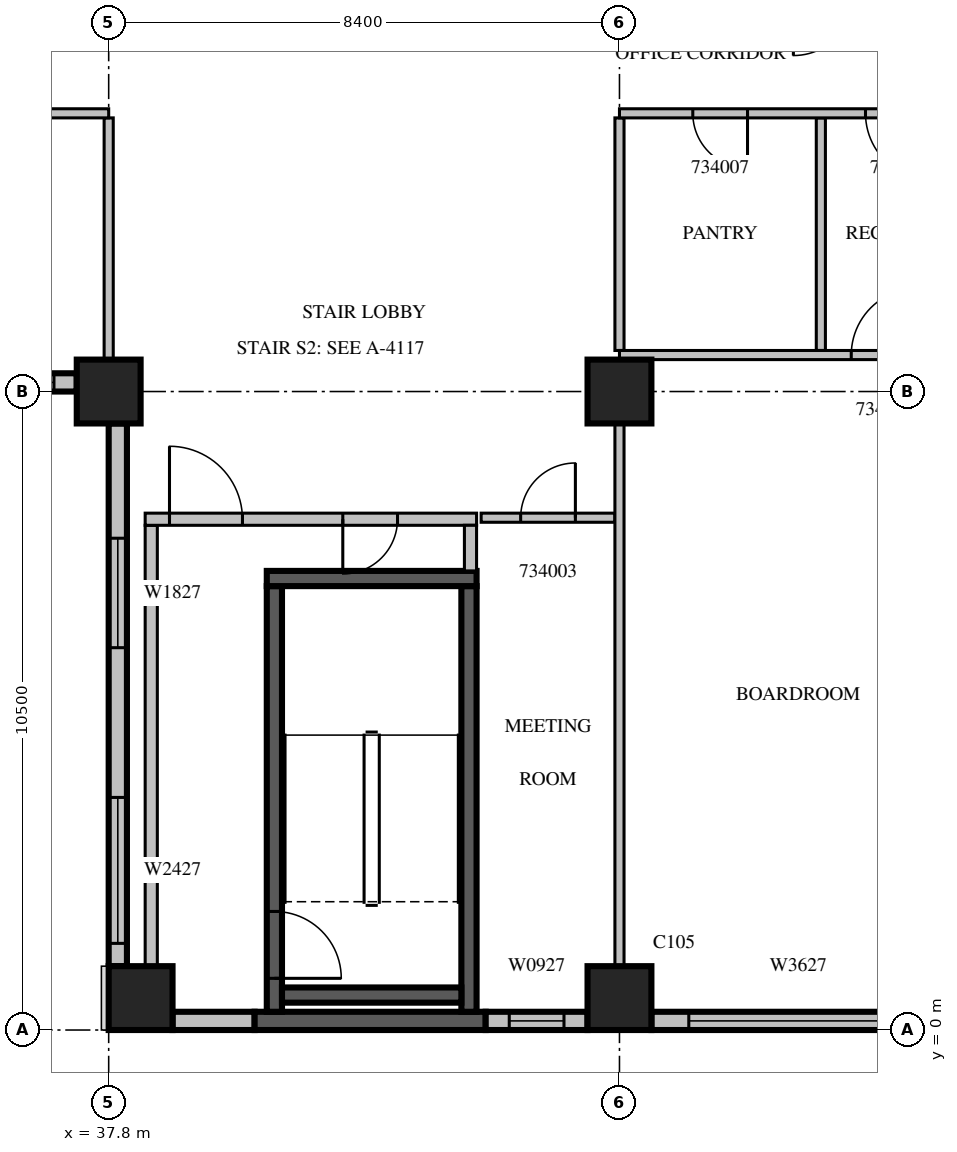
"""IFC4 building model, lengths in metres.
Left out: names, types, materials, properties, quantities, classifications, styles, units other than length and angle.
Written with IfcOpenShell. Run it as: python <this file> out.ifc"""

import sys

from ifc_helpers import new_model, si_unit, direction, frame, frame_2d, origin, origin_2d, place, context, subcontext, project, spatial, rectangle, extrude, source, transform, mapped, element, fill, save


model = new_model("IFC4")
c1 = context("Model", 3, precision=1e-05, world=origin(), true_north=direction((0.0, 1.0)))
c2 = subcontext(c1, "Body", "Model", "MODEL_VIEW")
j1 = project(units=[si_unit("LENGTHUNIT", "METRE"), si_unit("PLANEANGLEUNIT", "RADIAN")], contexts=[c1])
p1 = place(None, origin())
s1 = spatial("IfcSite", under=j1, at=p1, CompositionType="ELEMENT")
p2 = place(p1, origin())
s2 = spatial("IfcBuilding", under=s1, at=p2, CompositionType="ELEMENT")
p3 = place(p2, frame((0.0, 0.0, 153.9)))
s3 = spatial("IfcBuildingStorey", under=s2, at=p3, CompositionType="ELEMENT", Elevation=153.9)
m1 = source(origin(), c2, "Body", "SweptSolid", [
    extrude(rectangle(XDim=1.05, YDim=1.05, at=origin_2d()), origin(), (0.0, 0.0, 1.0), 4.2),
])
for number, where, z_axis, x_axis in (
    (1, (38.325, 0.525, 0.0), (0.0, 0.0, 1.0), (1.0, 0.0, 0.0)),
    (2, (46.2, 0.525, 0.0), (0.0, 0.0, 1.0), (1.0, 0.0, 0.0)),
    (3, (37.8, 10.5, 0.0), (0.0, 0.0, 1.0), (1.0, 0.0, 0.0)),
    (4, (46.2, 10.5, 0.0), (0.0, 0.0, 1.0), (1.0, 0.0, 0.0)),
):
    element("IfcColumn", number, at=place(p3, frame(where, z_axis=z_axis, x_axis=x_axis)), inside=s3, PredefinedType="COLUMN", context=c2, shape_type="MappedRepresentation", body=[
        mapped(m1, transform((0.0, 0.0, 0.0), scale=1.0)),
    ])
m2 = source(origin(), c2, "Body", "SweptSolid", [
    extrude(rectangle(XDim=7.35, YDim=0.3, at=frame_2d((3.675, 0.0))), origin(), (0.0, 0.0, 1.0), 3.8),
])
p4 = place(p3, frame((29.925, 10.65, 0.0), z_axis=(0.0, 0.0, 1.0), x_axis=(1.0, 0.0, 0.0)))
e5 = element("IfcWall", 5, at=p4, inside=s3, PredefinedType="STANDARD", context=c2, shape_type="MappedRepresentation", body=[
    mapped(m2, transform((0.0, 0.0, 0.0), scale=1.0)),
])
m3 = source(origin(), c2, "Body", "SweptSolid", [
    extrude(rectangle(XDim=2.4, YDim=2.7, at=frame_2d((1.2, 1.35))), frame((0.0, 0.16, 0.0), z_axis=(0.0, -1.0, 0.0), x_axis=(1.0, 0.0, 0.0)), (0.0, 0.0, 1.0), 0.32),
])
p5 = place(p4, frame((0.375, 0.0, 0.6)))
e6 = element("IfcOpeningElement", 6, at=p5, cuts=e5, PredefinedType="OPENING", context=c2, shape_type="MappedRepresentation", body=[
    mapped(m3, transform((0.0, 0.0, 0.0), scale=1.0)),
])
p6 = place(p4, frame((4.575, 0.0, 0.6)))
e7 = element("IfcOpeningElement", 7, at=p6, cuts=e5, PredefinedType="OPENING", context=c2, shape_type="MappedRepresentation", body=[
    mapped(m3, transform((0.0, 0.0, 0.0), scale=1.0)),
])
m4 = source(origin(), c2, "Body", "SweptSolid", [
    extrude(rectangle(XDim=8.925, YDim=0.3, at=frame_2d((4.463, 0.0))), origin(), (0.0, 0.0, 1.0), 3.8),
])
p7 = place(p3, frame((37.95, 9.975, 0.0), z_axis=(0.0, 0.0, 1.0), x_axis=(0.0, -1.0, 0.0)))
e8 = element("IfcWall", 8, at=p7, inside=s3, PredefinedType="STANDARD", context=c2, shape_type="MappedRepresentation", body=[
    mapped(m4, transform((0.0, 0.0, 0.0), scale=1.0)),
])
m5 = source(origin(), c2, "Body", "SweptSolid", [
    extrude(rectangle(XDim=1.8, YDim=2.7, at=frame_2d((0.9, 1.35))), frame((0.0, 0.16, 0.0), z_axis=(0.0, -1.0, 0.0), x_axis=(1.0, 0.0, 0.0)), (0.0, 0.0, 1.0), 0.32),
])
p8 = place(p7, frame((1.887, 0.0, 0.6)))
e9 = element("IfcOpeningElement", 9, at=p8, cuts=e8, PredefinedType="OPENING", context=c2, shape_type="MappedRepresentation", body=[
    mapped(m5, transform((0.0, 0.0, 0.0), scale=1.0)),
])
p9 = place(p7, frame((6.15, 0.0, 0.6)))
e10 = element("IfcOpeningElement", 10, at=p9, cuts=e8, PredefinedType="OPENING", context=c2, shape_type="MappedRepresentation", body=[
    mapped(m3, transform((0.0, 0.0, 0.0), scale=1.0)),
])
m6 = source(origin(), c2, "Body", "SweptSolid", [
    extrude(rectangle(XDim=1.35, YDim=0.3, at=frame_2d((0.675, 0.0))), origin(), (0.0, 0.0, 1.0), 3.8),
])
p10 = place(p3, frame((38.85, 0.15, 0.0), z_axis=(0.0, 0.0, 1.0), x_axis=(1.0, 0.0, 0.0)))
e11 = element("IfcWall", 11, at=p10, inside=s3, PredefinedType="STANDARD", context=c2, shape_type="MappedRepresentation", body=[
    mapped(m6, transform((0.0, 0.0, 0.0), scale=1.0)),
])
m7 = source(origin(), c2, "Body", "SweptSolid", [
    extrude(rectangle(XDim=3.8, YDim=0.3, at=frame_2d((1.9, 0.0))), origin(), (0.0, 0.0, 1.0), 3.8),
])
p11 = place(p3, frame((40.2, 0.15, 0.0), z_axis=(0.0, 0.0, 1.0), x_axis=(1.0, 0.0, 0.0)))
e12 = element("IfcWall", 12, at=p11, inside=s3, PredefinedType="SOLIDWALL", context=c2, shape_type="MappedRepresentation", body=[
    mapped(m7, transform((0.0, 0.0, 0.0), scale=1.0)),
])
m8 = source(origin(), c2, "Body", "SweptSolid", [
    extrude(rectangle(XDim=1.675, YDim=0.3, at=frame_2d((0.838, 0.0))), origin(), (0.0, 0.0, 1.0), 3.8),
])
p12 = place(p3, frame((44.0, 0.15, 0.0), z_axis=(0.0, 0.0, 1.0), x_axis=(1.0, 0.0, 0.0)))
e13 = element("IfcWall", 13, at=p12, inside=s3, PredefinedType="STANDARD", context=c2, shape_type="MappedRepresentation", body=[
    mapped(m8, transform((0.0, 0.0, 0.0), scale=1.0)),
])
m9 = source(origin(), c2, "Body", "SweptSolid", [
    extrude(rectangle(XDim=0.9, YDim=2.7, at=frame_2d((0.45, 1.35))), frame((0.0, 0.16, 0.0), z_axis=(0.0, -1.0, 0.0), x_axis=(1.0, 0.0, 0.0)), (0.0, 0.0, 1.0), 0.32),
])
p13 = place(p12, frame((0.388, 0.0, 0.6)))
e14 = element("IfcOpeningElement", 14, at=p13, cuts=e13, PredefinedType="OPENING", context=c2, shape_type="MappedRepresentation", body=[
    mapped(m9, transform((0.0, 0.0, 0.0), scale=1.0)),
])
m10 = source(origin(), c2, "Body", "SweptSolid", [
    extrude(rectangle(XDim=4.83, YDim=0.3, at=frame_2d((2.415, 0.0))), origin(), (0.0, 0.0, 1.0), 3.8),
])
p14 = place(p3, frame((46.725, 0.15, 0.0), z_axis=(0.0, 0.0, 1.0), x_axis=(1.0, 0.0, 0.0)))
e15 = element("IfcWall", 15, at=p14, inside=s3, PredefinedType="STANDARD", context=c2, shape_type="MappedRepresentation", body=[
    mapped(m10, transform((0.0, 0.0, 0.0), scale=1.0)),
])
m11 = source(origin(), c2, "Body", "SweptSolid", [
    extrude(rectangle(XDim=3.6, YDim=2.7, at=frame_2d((1.8, 1.35))), frame((0.0, 0.16, 0.0), z_axis=(0.0, -1.0, 0.0), x_axis=(1.0, 0.0, 0.0)), (0.0, 0.0, 1.0), 0.32),
])
p15 = place(p14, frame((0.615, 0.0, 0.6)))
e16 = element("IfcOpeningElement", 16, at=p15, cuts=e15, PredefinedType="OPENING", context=c2, shape_type="MappedRepresentation", body=[
    mapped(m11, transform((0.0, 0.0, 0.0), scale=1.0)),
])
m12 = source(origin(), c2, "Body", "SweptSolid", [
    extrude(rectangle(XDim=7.0, YDim=0.25, at=frame_2d((3.5, 0.0))), origin(), (0.0, 0.0, 1.0), 3.8),
])
p16 = place(p3, frame((40.525, 0.3, 0.0), z_axis=(0.0, 0.0, 1.0), x_axis=(0.0, 1.0, 0.0)))
e17 = element("IfcWall", 17, at=p16, inside=s3, PredefinedType="SOLIDWALL", context=c2, shape_type="MappedRepresentation", body=[
    mapped(m12, transform((0.0, 0.0, 0.0), scale=1.0)),
])
m13 = source(origin(), c2, "Body", "SweptSolid", [
    extrude(rectangle(XDim=1.1, YDim=2.1, at=frame_2d((0.55, 1.05))), frame((0.0, 0.135, 0.0), z_axis=(0.0, -1.0, 0.0), x_axis=(1.0, 0.0, 0.0)), (0.0, 0.0, 1.0), 0.27),
])
p17 = place(p16, frame((0.55, 0.0, 0.0)))
e18 = element("IfcOpeningElement", 18, at=p17, cuts=e17, PredefinedType="OPENING", context=c2, shape_type="MappedRepresentation", body=[
    mapped(m13, transform((0.0, 0.0, 0.0), scale=1.0)),
])
p18 = place(p3, frame((43.725, 0.3, 0.0), z_axis=(0.0, 0.0, 1.0), x_axis=(0.0, 1.0, 0.0)))
e19 = element("IfcWall", 19, at=p18, inside=s3, PredefinedType="SOLIDWALL", context=c2, shape_type="MappedRepresentation", body=[
    mapped(m12, transform((0.0, 0.0, 0.0), scale=1.0)),
])
m14 = source(origin(), c2, "Body", "SweptSolid", [
    extrude(rectangle(XDim=3.45, YDim=0.25, at=frame_2d((1.725, 0.0))), origin(), (0.0, 0.0, 1.0), 3.8),
])
p19 = place(p3, frame((40.4, 7.425, 0.0), z_axis=(0.0, 0.0, 1.0), x_axis=(1.0, 0.0, 0.0)))
e20 = element("IfcWall", 20, at=p19, inside=s3, PredefinedType="SOLIDWALL", context=c2, shape_type="MappedRepresentation", body=[
    mapped(m14, transform((0.0, 0.0, 0.0), scale=1.0)),
])
m15 = source(origin(), c2, "Body", "SweptSolid", [
    extrude(rectangle(XDim=2.95, YDim=0.25, at=frame_2d((1.475, 0.0))), origin(), (0.0, 0.0, 1.0), 3.8),
])
p20 = place(p3, frame((40.65, 0.575, 0.0), z_axis=(0.0, 0.0, 1.0), x_axis=(1.0, 0.0, 0.0)))
e21 = element("IfcWall", 21, at=p20, inside=s3, PredefinedType="SOLIDWALL", context=c2, shape_type="MappedRepresentation", body=[
    mapped(m15, transform((0.0, 0.0, 0.0), scale=1.0)),
])
m16 = source(origin(), c2, "Body", "SweptSolid", [
    extrude(rectangle(XDim=8.0, YDim=0.2, at=frame_2d((4.0, 0.0))), origin(), (0.0, 0.0, 1.0), 3.8),
])
p21 = place(p3, frame((38.5, 0.3, 0.0), z_axis=(0.0, 0.0, 1.0), x_axis=(0.0, 1.0, 0.0)))
e22 = element("IfcWall", 22, at=p21, inside=s3, PredefinedType="PARTITIONING", context=c2, shape_type="MappedRepresentation", body=[
    mapped(m16, transform((0.0, 0.0, 0.0), scale=1.0)),
])
m17 = source(origin(), c2, "Body", "SweptSolid", [
    extrude(rectangle(XDim=5.45, YDim=0.2, at=frame_2d((2.725, 0.0))), origin(), (0.0, 0.0, 1.0), 3.8),
])
p22 = place(p3, frame((38.4, 8.4, 0.0), z_axis=(0.0, 0.0, 1.0), x_axis=(1.0, 0.0, 0.0)))
e23 = element("IfcWall", 23, at=p22, inside=s3, PredefinedType="PARTITIONING", context=c2, shape_type="MappedRepresentation", body=[
    mapped(m17, transform((0.0, 0.0, 0.0), scale=1.0)),
])
m18 = source(origin(), c2, "Body", "SweptSolid", [
    extrude(rectangle(XDim=1.2, YDim=2.1, at=frame_2d((0.6, 1.05))), frame((0.0, 0.11, 0.0), z_axis=(0.0, -1.0, 0.0), x_axis=(1.0, 0.0, 0.0)), (0.0, 0.0, 1.0), 0.22),
])
p23 = place(p22, frame((0.4, 0.0, 0.0)))
e24 = element("IfcOpeningElement", 24, at=p23, cuts=e23, PredefinedType="OPENING", context=c2, shape_type="MappedRepresentation", body=[
    mapped(m18, transform((0.0, 0.0, 0.0), scale=1.0)),
])
m19 = source(origin(), c2, "Body", "SweptSolid", [
    extrude(rectangle(XDim=0.9, YDim=2.1, at=frame_2d((0.45, 1.05))), frame((0.0, 0.11, 0.0), z_axis=(0.0, -1.0, 0.0), x_axis=(1.0, 0.0, 0.0)), (0.0, 0.0, 1.0), 0.22),
])
p24 = place(p22, frame((3.25, 0.0, 0.0)))
e25 = element("IfcOpeningElement", 25, at=p24, cuts=e23, PredefinedType="OPENING", context=c2, shape_type="MappedRepresentation", body=[
    mapped(m19, transform((0.0, 0.0, 0.0), scale=1.0)),
])
m20 = source(origin(), c2, "Body", "SweptSolid", [
    extrude(rectangle(XDim=0.75, YDim=0.2, at=frame_2d((0.375, 0.0))), origin(), (0.0, 0.0, 1.0), 3.8),
])
p25 = place(p3, frame((43.75, 7.55, 0.0), z_axis=(0.0, 0.0, 1.0), x_axis=(0.0, 1.0, 0.0)))
e26 = element("IfcWall", 26, at=p25, inside=s3, PredefinedType="PARTITIONING", context=c2, shape_type="MappedRepresentation", body=[
    mapped(m20, transform((0.0, 0.0, 0.0), scale=1.0)),
])
m21 = source(origin(), c2, "Body", "SweptSolid", [
    extrude(rectangle(XDim=2.2, YDim=0.15, at=frame_2d((1.1, 0.0))), origin(), (0.0, 0.0, 1.0), 3.8),
])
p26 = place(p3, frame((46.125, 8.425, 0.0), z_axis=(0.0, 0.0, 1.0), x_axis=(-1.0, 0.0, 0.0)))
e27 = element("IfcWall", 27, at=p26, inside=s3, PredefinedType="PARTITIONING", context=c2, shape_type="MappedRepresentation", body=[
    mapped(m21, transform((0.0, 0.0, 0.0), scale=1.0)),
])
m22 = source(origin(), c2, "Body", "SweptSolid", [
    extrude(rectangle(XDim=0.9, YDim=2.1, at=frame_2d((0.45, 1.05))), frame((0.0, 0.085, 0.0), z_axis=(0.0, -1.0, 0.0), x_axis=(1.0, 0.0, 0.0)), (0.0, 0.0, 1.0), 0.17),
])
p27 = place(p26, frame((0.65, 0.0, 0.0)))
e28 = element("IfcOpeningElement", 28, at=p27, cuts=e27, PredefinedType="OPENING", context=c2, shape_type="MappedRepresentation", body=[
    mapped(m22, transform((0.0, 0.0, 0.0), scale=1.0)),
])
m23 = source(origin(), c2, "Body", "SweptSolid", [
    extrude(rectangle(XDim=3.976, YDim=0.15, at=frame_2d((1.988, 0.0))), origin(), (0.0, 0.0, 1.0), 3.8),
])
p28 = place(p3, frame((37.8, 11.024, 0.0), z_axis=(0.0, 0.0, 1.0), x_axis=(0.0, 1.0, 0.0)))
e29 = element("IfcWall", 29, at=p28, inside=s3, PredefinedType="PARTITIONING", context=c2, shape_type="MappedRepresentation", body=[
    mapped(m23, transform((0.0, 0.0, 0.0), scale=1.0)),
])
m24 = source(origin(), c2, "Body", "SweptSolid", [
    extrude(rectangle(XDim=3.825, YDim=0.15, at=frame_2d((1.913, 0.0))), origin(), (0.0, 0.0, 1.0), 3.8),
])
p29 = place(p3, frame((49.512, 11.175, 0.0), z_axis=(0.0, 0.0, 1.0), x_axis=(0.0, 1.0, 0.0)))
e30 = element("IfcWall", 30, at=p29, inside=s3, PredefinedType="PARTITIONING", context=c2, shape_type="MappedRepresentation", body=[
    mapped(m24, transform((0.0, 0.0, 0.0), scale=1.0)),
])
m25 = source(origin(), c2, "Body", "SweptSolid", [
    extrude(rectangle(XDim=8.927, YDim=0.15, at=frame_2d((4.463, 0.0))), origin(), (0.0, 0.0, 1.0), 3.8),
])
p30 = place(p3, frame((46.2, 1.049, 0.0), z_axis=(0.0, 0.0, 1.0), x_axis=(0.0, 1.0, 0.0)))
e31 = element("IfcWall", 31, at=p30, inside=s3, PredefinedType="PARTITIONING", context=c2, shape_type="MappedRepresentation", body=[
    mapped(m25, transform((0.0, 0.0, 0.0), scale=1.0)),
])
p31 = place(p3, frame((46.2, 11.175, 0.0), z_axis=(0.0, 0.0, 1.0), x_axis=(0.0, 1.0, 0.0)))
e32 = element("IfcWall", 32, at=p31, inside=s3, PredefinedType="PARTITIONING", context=c2, shape_type="MappedRepresentation", body=[
    mapped(m24, transform((0.0, 0.0, 0.0), scale=1.0)),
])
m26 = source(origin(), c2, "Body", "SweptSolid", [
    extrude(rectangle(XDim=24.9, YDim=0.15, at=frame_2d((12.45, 0.0))), origin(), (0.0, 0.0, 1.0), 3.8),
])
p32 = place(p3, frame((71.1, 11.1, 0.0), z_axis=(0.0, 0.0, 1.0), x_axis=(-1.0, 0.0, 0.0)))
e33 = element("IfcWall", 33, at=p32, inside=s3, PredefinedType="PARTITIONING", context=c2, shape_type="MappedRepresentation", body=[
    mapped(m26, transform((0.0, 0.0, 0.0), scale=1.0)),
])
m27 = source(origin(), c2, "Body", "SweptSolid", [
    extrude(rectangle(XDim=1.1, YDim=2.1, at=frame_2d((0.55, 1.05))), frame((0.0, 0.085, 0.0), z_axis=(0.0, -1.0, 0.0), x_axis=(1.0, 0.0, 0.0)), (0.0, 0.0, 1.0), 0.17),
])
p33 = place(p32, frame((19.988, 0.0, 0.0)))
e34 = element("IfcOpeningElement", 34, at=p33, cuts=e33, PredefinedType="OPENING", context=c2, shape_type="MappedRepresentation", body=[
    mapped(m27, transform((0.0, 0.0, 0.0), scale=1.0)),
])
p34 = place(p32, frame((15.63, 0.0, 0.0)))
e35 = element("IfcOpeningElement", 35, at=p34, cuts=e33, PredefinedType="OPENING", context=c2, shape_type="MappedRepresentation", body=[
    mapped(m22, transform((0.0, 0.0, 0.0), scale=1.0)),
])
p35 = place(p32, frame((9.75, 0.0, 0.0)))
e36 = element("IfcOpeningElement", 36, at=p35, cuts=e33, PredefinedType="OPENING", context=c2, shape_type="MappedRepresentation", body=[
    mapped(m22, transform((0.0, 0.0, 0.0), scale=1.0)),
])
p36 = place(p32, frame((2.205, 0.0, 0.0)))
e37 = element("IfcOpeningElement", 37, at=p36, cuts=e33, PredefinedType="OPENING", context=c2, shape_type="MappedRepresentation", body=[
    mapped(m22, transform((0.0, 0.0, 0.0), scale=1.0)),
])
m28 = source(origin(), c2, "Body", "SweptSolid", [
    extrude(rectangle(XDim=8.4, YDim=0.15, at=frame_2d((4.2, 0.0))), origin(), (0.0, 0.0, 1.0), 3.8),
])
p37 = place(p3, frame((37.8, 15.075, 0.0), z_axis=(0.0, 0.0, 1.0), x_axis=(-1.0, 0.0, 0.0)))
e38 = element("IfcWall", 38, at=p37, inside=s3, PredefinedType="PARTITIONING", context=c2, shape_type="MappedRepresentation", body=[
    mapped(m28, transform((0.0, 0.0, 0.0), scale=1.0)),
])
m29 = source(origin(), c2, "Body", "SweptSolid", [
    extrude(rectangle(XDim=1.2, YDim=2.1, at=frame_2d((0.6, 1.05))), frame((0.0, 0.085, 0.0), z_axis=(0.0, -1.0, 0.0), x_axis=(1.0, 0.0, 0.0)), (0.0, 0.0, 1.0), 0.17),
])
p38 = place(p37, frame((3.6, 0.0, 0.0)))
e39 = element("IfcOpeningElement", 39, at=p38, cuts=e38, PredefinedType="OPENING", context=c2, shape_type="MappedRepresentation", body=[
    mapped(m29, transform((0.0, 0.0, 0.0), scale=1.0)),
])
p39 = place(p3, frame((71.1, 15.075, 0.0), z_axis=(0.0, 0.0, 1.0), x_axis=(-1.0, 0.0, 0.0)))
e40 = element("IfcWall", 40, at=p39, inside=s3, PredefinedType="PARTITIONING", context=c2, shape_type="MappedRepresentation", body=[
    mapped(m26, transform((0.0, 0.0, 0.0), scale=1.0)),
])
p40 = place(p39, frame((19.754, 0.0, 0.0)))
e41 = element("IfcOpeningElement", 41, at=p40, cuts=e40, PredefinedType="OPENING", context=c2, shape_type="MappedRepresentation", body=[
    mapped(m27, transform((0.0, 0.0, 0.0), scale=1.0)),
])
p41 = place(p39, frame((22.794, 0.0, 0.0)))
e42 = element("IfcOpeningElement", 42, at=p41, cuts=e40, PredefinedType="OPENING", context=c2, shape_type="MappedRepresentation", body=[
    mapped(m22, transform((0.0, 0.0, 0.0), scale=1.0)),
])
p42 = place(p39, frame((10.65, 0.0, 0.0)))
e43 = element("IfcOpeningElement", 43, at=p42, cuts=e40, PredefinedType="OPENING", context=c2, shape_type="MappedRepresentation", body=[
    mapped(m29, transform((0.0, 0.0, 0.0), scale=1.0)),
])
p43 = place(p39, frame((1.103, 0.0, 0.0)))
e44 = element("IfcOpeningElement", 44, at=p43, cuts=e40, PredefinedType="OPENING", context=c2, shape_type="MappedRepresentation", body=[
    mapped(m29, transform((0.0, 0.0, 0.0), scale=1.0)),
])
m30 = source(origin(), c2, "Body", "SweptSolid", [
    extrude(rectangle(XDim=2.4, YDim=2.7, at=frame_2d((1.2, 1.35))), frame((0.0, 0.03, 0.0), z_axis=(0.0, -1.0, 0.0), x_axis=(1.0, 0.0, 0.0)), (0.0, 0.0, 1.0), 0.06),
])
p44 = place(p6, origin())
e45 = element("IfcWindow", 45, at=p44, inside=s3, PartitioningType="SINGLE_PANEL", PredefinedType="WINDOW", context=c2, shape_type="MappedRepresentation", body=[
    mapped(m30, transform((0.0, 0.0, 0.0), scale=1.0)),
])
fill(e7, e45)
m31 = source(origin(), c2, "Body", "SweptSolid", [
    extrude(rectangle(XDim=1.8, YDim=2.7, at=frame_2d((0.9, 1.35))), frame((0.0, 0.03, 0.0), z_axis=(0.0, -1.0, 0.0), x_axis=(1.0, 0.0, 0.0)), (0.0, 0.0, 1.0), 0.06),
])
p45 = place(p8, origin())
e46 = element("IfcWindow", 46, at=p45, inside=s3, PartitioningType="SINGLE_PANEL", PredefinedType="WINDOW", context=c2, shape_type="MappedRepresentation", body=[
    mapped(m31, transform((0.0, 0.0, 0.0), scale=1.0)),
])
fill(e9, e46)
p46 = place(p9, origin())
e47 = element("IfcWindow", 47, at=p46, inside=s3, PartitioningType="SINGLE_PANEL", PredefinedType="WINDOW", context=c2, shape_type="MappedRepresentation", body=[
    mapped(m30, transform((0.0, 0.0, 0.0), scale=1.0)),
])
fill(e10, e47)
m32 = source(origin(), c2, "Body", "SweptSolid", [
    extrude(rectangle(XDim=0.9, YDim=2.7, at=frame_2d((0.45, 1.35))), frame((0.0, 0.03, 0.0), z_axis=(0.0, -1.0, 0.0), x_axis=(1.0, 0.0, 0.0)), (0.0, 0.0, 1.0), 0.06),
])
p47 = place(p13, origin())
e48 = element("IfcWindow", 48, at=p47, inside=s3, PartitioningType="SINGLE_PANEL", PredefinedType="WINDOW", context=c2, shape_type="MappedRepresentation", body=[
    mapped(m32, transform((0.0, 0.0, 0.0), scale=1.0)),
])
fill(e14, e48)
m33 = source(origin(), c2, "Body", "SweptSolid", [
    extrude(rectangle(XDim=3.6, YDim=2.7, at=frame_2d((1.8, 1.35))), frame((0.0, 0.03, 0.0), z_axis=(0.0, -1.0, 0.0), x_axis=(1.0, 0.0, 0.0)), (0.0, 0.0, 1.0), 0.06),
])
p48 = place(p15, origin())
e49 = element("IfcWindow", 49, at=p48, inside=s3, PartitioningType="SINGLE_PANEL", PredefinedType="WINDOW", context=c2, shape_type="MappedRepresentation", body=[
    mapped(m33, transform((0.0, 0.0, 0.0), scale=1.0)),
])
fill(e16, e49)
m34 = source(origin(), c2, "Body", "SweptSolid", [
    extrude(rectangle(XDim=1.1, YDim=2.1, at=frame_2d((0.55, 1.05))), frame((0.0, 0.025, 0.0), z_axis=(0.0, -1.0, 0.0), x_axis=(1.0, 0.0, 0.0)), (0.0, 0.0, 1.0), 0.05),
])
p49 = place(p17, origin())
e50 = element("IfcDoor", 50, at=p49, inside=s3, OperationType="SINGLE_SWING_RIGHT", PredefinedType="DOOR", context=c2, shape_type="MappedRepresentation", body=[
    mapped(m34, transform((0.0, 0.0, 0.0), scale=1.0)),
])
fill(e18, e50)
m35 = source(origin(), c2, "Body", "SweptSolid", [
    extrude(rectangle(XDim=1.2, YDim=2.1, at=frame_2d((0.6, 1.05))), frame((0.0, 0.025, 0.0), z_axis=(0.0, -1.0, 0.0), x_axis=(1.0, 0.0, 0.0)), (0.0, 0.0, 1.0), 0.05),
])
p50 = place(p23, origin())
e51 = element("IfcDoor", 51, at=p50, inside=s3, OperationType="SINGLE_SWING_LEFT", PredefinedType="DOOR", context=c2, shape_type="MappedRepresentation", body=[
    mapped(m35, transform((0.0, 0.0, 0.0), scale=1.0)),
])
fill(e24, e51)
m36 = source(origin(), c2, "Body", "SweptSolid", [
    extrude(rectangle(XDim=0.9, YDim=2.1, at=frame_2d((0.45, 1.05))), frame((0.0, 0.025, 0.0), z_axis=(0.0, -1.0, 0.0), x_axis=(1.0, 0.0, 0.0)), (0.0, 0.0, 1.0), 0.05),
])
p51 = place(p24, origin())
e52 = element("IfcDoor", 52, at=p51, inside=s3, OperationType="SINGLE_SWING_RIGHT", PredefinedType="DOOR", context=c2, shape_type="MappedRepresentation", body=[
    mapped(m36, transform((0.0, 0.0, 0.0), scale=1.0)),
])
fill(e25, e52)
p52 = place(p27, origin())
e53 = element("IfcDoor", 53, at=p52, inside=s3, OperationType="SINGLE_SWING_RIGHT", PredefinedType="DOOR", context=c2, shape_type="MappedRepresentation", body=[
    mapped(m36, transform((0.0, 0.0, 0.0), scale=1.0)),
])
fill(e28, e53)
p53 = place(p40, origin())
e54 = element("IfcDoor", 54, at=p53, inside=s3, OperationType="SINGLE_SWING_LEFT", PredefinedType="DOOR", context=c2, shape_type="MappedRepresentation", body=[
    mapped(m34, transform((0.0, 0.0, 0.0), scale=1.0)),
])
fill(e41, e54)
p54 = place(p33, origin())
e55 = element("IfcDoor", 55, at=p54, inside=s3, OperationType="SINGLE_SWING_RIGHT", PredefinedType="DOOR", context=c2, shape_type="MappedRepresentation", body=[
    mapped(m34, transform((0.0, 0.0, 0.0), scale=1.0)),
])
fill(e34, e55)
p55 = place(p41, origin())
e56 = element("IfcDoor", 56, at=p55, inside=s3, OperationType="SINGLE_SWING_LEFT", PredefinedType="DOOR", context=c2, shape_type="MappedRepresentation", body=[
    mapped(m36, transform((0.0, 0.0, 0.0), scale=1.0)),
])
fill(e42, e56)
save(model, sys.argv[1])
